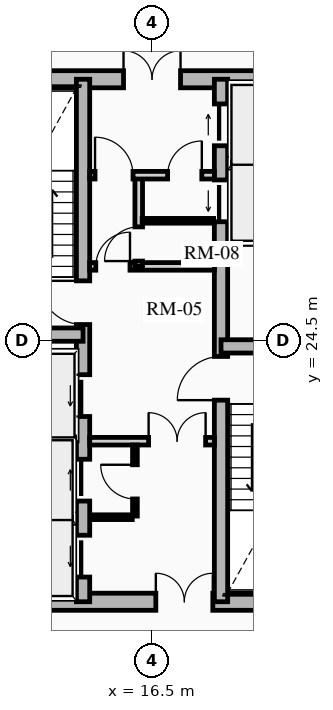
"""IFC4 building model, lengths in metres.
Left out: names, types, materials, properties, quantities, classifications, styles, units other than length and angle.
Written with IfcOpenShell. Run it as: python <this file> out.ifc"""

import sys

from ifc_helpers import new_model, si_unit, direction, frame, frame_2d, origin, place, context, subcontext, project, spatial, rectangle, extrude, source, transform, mapped, element, fill, save


model = new_model("IFC4")
c1 = context("Model", 3, precision=1e-05, world=origin(), true_north=direction((0.0, 1.0)))
c2 = subcontext(c1, "Body", "Model", "MODEL_VIEW")
j1 = project(units=[si_unit("LENGTHUNIT", "METRE"), si_unit("PLANEANGLEUNIT", "RADIAN")], contexts=[c1])
p1 = place(None, origin())
s1 = spatial("IfcSite", under=j1, at=p1, CompositionType="ELEMENT")
p2 = place(p1, origin())
s2 = spatial("IfcBuilding", under=s1, at=p2, CompositionType="ELEMENT")
p3 = place(p2, frame((0.0, 0.0, 125.44)))
s3 = spatial("IfcBuildingStorey", under=s2, at=p3, CompositionType="ELEMENT", Elevation=125.44)
p4 = place(p3, frame((11.15, 17.625, 0.0), z_axis=(0.0, 0.0, 1.0), x_axis=(1.0, 0.0, 0.0)))
e1 = element("IfcWall", 1, at=p4, inside=s3, PredefinedType="SHEAR", context=c2, shape_type="SweptSolid", body=[
    extrude(rectangle(XDim=10.7, YDim=0.45, at=frame_2d((5.35, 0.0))), origin(), (0.0, 0.0, 1.0), 3.72),
])
m1 = source(origin(), c2, "Body", "SweptSolid", [
    extrude(rectangle(XDim=1.5, YDim=2.02, at=frame_2d((0.75, 1.01))), frame((0.0, 0.235, 0.0), z_axis=(0.0, -1.0, 0.0), x_axis=(1.0, 0.0, 0.0)), (0.0, 0.0, 1.0), 0.47),
])
p5 = place(p4, frame((5.45, 0.0, 0.0)))
e2 = element("IfcOpeningElement", 2, at=p5, cuts=e1, PredefinedType="OPENING", context=c2, shape_type="MappedRepresentation", body=[
    mapped(m1, transform((0.0, 0.0, 0.0), x_axis=(1.0, 0.0, 0.0), y_axis=(0.0, 1.0, 0.0), z_axis=(0.0, 0.0, 1.0), scale=1.0)),
])
p6 = place(p3, frame((11.15, 31.375, 0.0), z_axis=(0.0, 0.0, 1.0), x_axis=(1.0, 0.0, 0.0)))
e3 = element("IfcWall", 3, at=p6, inside=s3, PredefinedType="SHEAR", context=c2, shape_type="SweptSolid", body=[
    extrude(rectangle(XDim=10.7, YDim=0.45, at=frame_2d((5.35, 0.0))), origin(), (0.0, 0.0, 1.0), 3.72),
])
p7 = place(p6, frame((4.6, 0.0, 0.0)))
e4 = element("IfcOpeningElement", 4, at=p7, cuts=e3, PredefinedType="OPENING", context=c2, shape_type="MappedRepresentation", body=[
    mapped(m1, transform((0.0, 0.0, 0.0), x_axis=(1.0, 0.0, 0.0), y_axis=(0.0, 1.0, 0.0), z_axis=(0.0, 0.0, 1.0), scale=1.0)),
])
p8 = place(p3, frame((14.685, 17.625, 0.0), z_axis=(0.0, 0.0, 1.0), x_axis=(0.0, 1.0, 0.0)))
e5 = element("IfcWall", 5, at=p8, inside=s3, PredefinedType="SHEAR", context=c2, shape_type="SweptSolid", body=[
    extrude(rectangle(XDim=13.75, YDim=0.35, at=frame_2d((6.875, 0.0))), origin(), (0.0, 0.0, 1.0), 3.72),
])
m2 = source(origin(), c2, "Body", "SweptSolid", [
    extrude(rectangle(XDim=1.1, YDim=2.015, at=frame_2d((0.55, 1.007))), frame((0.0, 0.185, 0.0), z_axis=(0.0, -1.0, 0.0), x_axis=(1.0, 0.0, 0.0)), (0.0, 0.0, 1.0), 0.37),
])
p9 = place(p8, frame((4.875, 0.0, 0.0)))
e6 = element("IfcOpeningElement", 6, at=p9, cuts=e5, PredefinedType="OPENING", context=c2, shape_type="MappedRepresentation", body=[
    mapped(m2, transform((0.0, 0.0, 0.0), x_axis=(1.0, 0.0, 0.0), y_axis=(0.0, 1.0, 0.0), z_axis=(0.0, 0.0, 1.0), scale=1.0)),
])
p10 = place(p8, frame((0.65, 0.0, 0.0)))
e7 = element("IfcOpeningElement", 7, at=p10, cuts=e5, PredefinedType="OPENING", context=c2, shape_type="MappedRepresentation", body=[
    mapped(m2, transform((0.0, 0.0, 0.0), x_axis=(1.0, 0.0, 0.0), y_axis=(0.0, 1.0, 0.0), z_axis=(0.0, 0.0, 1.0), scale=1.0)),
])
p11 = place(p8, frame((2.65, 0.0, 0.0)))
e8 = element("IfcOpeningElement", 8, at=p11, cuts=e5, PredefinedType="OPENING", context=c2, shape_type="MappedRepresentation", body=[
    mapped(m2, transform((0.0, 0.0, 0.0), x_axis=(1.0, 0.0, 0.0), y_axis=(0.0, 1.0, 0.0), z_axis=(0.0, 0.0, 1.0), scale=1.0)),
])
m3 = source(origin(), c2, "Body", "SweptSolid", [
    extrude(rectangle(XDim=1.15, YDim=2.02, at=frame_2d((0.575, 1.01))), frame((0.0, 0.185, 0.0), z_axis=(0.0, -1.0, 0.0), x_axis=(1.0, 0.0, 0.0)), (0.0, 0.0, 1.0), 0.37),
])
p12 = place(p8, frame((7.295, 0.0, 0.0)))
e9 = element("IfcOpeningElement", 9, at=p12, cuts=e5, PredefinedType="OPENING", context=c2, shape_type="MappedRepresentation", body=[
    mapped(m3, transform((0.0, 0.0, 0.0), x_axis=(1.0, 0.0, 0.0), y_axis=(0.0, 1.0, 0.0), z_axis=(0.0, 0.0, 1.0), scale=1.0)),
])
p13 = place(p3, frame((18.315, 17.625, 0.0), z_axis=(0.0, 0.0, 1.0), x_axis=(0.0, 1.0, 0.0)))
e10 = element("IfcWall", 10, at=p13, inside=s3, PredefinedType="SHEAR", context=c2, shape_type="SweptSolid", body=[
    extrude(rectangle(XDim=13.75, YDim=0.35, at=frame_2d((6.875, 0.0))), origin(), (0.0, 0.0, 1.0), 3.72),
])
p14 = place(p13, frame((10.0, 0.0, 0.0)))
e11 = element("IfcOpeningElement", 11, at=p14, cuts=e10, PredefinedType="OPENING", context=c2, shape_type="MappedRepresentation", body=[
    mapped(m2, transform((0.0, 0.0, 0.0), x_axis=(1.0, 0.0, 0.0), y_axis=(0.0, 1.0, 0.0), z_axis=(0.0, 0.0, 1.0), scale=1.0)),
])
p15 = place(p13, frame((12.0, 0.0, 0.0)))
e12 = element("IfcOpeningElement", 12, at=p15, cuts=e10, PredefinedType="OPENING", context=c2, shape_type="MappedRepresentation", body=[
    mapped(m2, transform((0.0, 0.0, 0.0), x_axis=(1.0, 0.0, 0.0), y_axis=(0.0, 1.0, 0.0), z_axis=(0.0, 0.0, 1.0), scale=1.0)),
])
p16 = place(p13, frame((5.305, 0.0, 0.0)))
e13 = element("IfcOpeningElement", 13, at=p16, cuts=e10, PredefinedType="OPENING", context=c2, shape_type="MappedRepresentation", body=[
    mapped(m3, transform((0.0, 0.0, 0.0), x_axis=(1.0, 0.0, 0.0), y_axis=(0.0, 1.0, 0.0), z_axis=(0.0, 0.0, 1.0), scale=1.0)),
])
for number, where, z_axis, x_axis in (
    (14, (11.4, 24.655, 0.0), (0.0, 0.0, 1.0), (1.0, 0.0, 0.0)),
    (15, (18.315, 24.345, 0.0), (0.0, 0.0, 1.0), (1.0, 0.0, 0.0)),
):
    element("IfcWall", number, at=place(p3, frame(where, z_axis=z_axis, x_axis=x_axis)), inside=s3, PredefinedType="SHEAR", context=c2, shape_type="SweptSolid", body=[
        extrude(rectangle(XDim=3.285, YDim=0.35, at=frame_2d((1.643, 0.0))), origin(), (0.0, 0.0, 1.0), 3.72),
    ])
for number, where, z_axis, x_axis in (
    (16, (11.52, 21.8, 0.0), (0.0, 0.0, 1.0), (1.0, 0.0, 0.0)),
    (17, (11.52, 19.825, 0.0), (0.0, 0.0, 1.0), (1.0, 0.0, 0.0)),
    (18, (18.51, 27.13, 0.0), (0.0, 0.0, 1.0), (1.0, 0.0, 0.0)),
    (19, (18.51, 29.175, 0.0), (0.0, 0.0, 1.0), (1.0, 0.0, 0.0)),
):
    element("IfcWall", number, at=place(p3, frame(where, z_axis=z_axis, x_axis=x_axis)), inside=s3, PredefinedType="SHEAR", context=c2, shape_type="SweptSolid", body=[
        extrude(rectangle(XDim=2.97, YDim=0.2, at=frame_2d((1.485, 0.0))), origin(), (0.0, 0.0, 1.0), 3.72),
    ])
p17 = place(p3, frame((14.86, 21.85, 0.0), z_axis=(0.0, 0.0, 1.0), x_axis=(1.0, 0.0, 0.0)))
e20 = element("IfcWall", 20, at=p17, inside=s3, PredefinedType="PARTITIONING", context=c2, shape_type="SweptSolid", body=[
    extrude(rectangle(XDim=3.28, YDim=0.2, at=frame_2d((1.64, 0.0))), origin(), (0.0, 0.0, 1.0), 3.425),
])
m4 = source(origin(), c2, "Body", "SweptSolid", [
    extrude(rectangle(XDim=1.5, YDim=2.02, at=frame_2d((0.75, 1.01))), frame((0.0, 0.11, 0.0), z_axis=(0.0, -1.0, 0.0), x_axis=(1.0, 0.0, 0.0)), (0.0, 0.0, 1.0), 0.22),
])
p18 = place(p17, frame((1.55, 0.0, 0.0)))
e21 = element("IfcOpeningElement", 21, at=p18, cuts=e20, PredefinedType="OPENING", context=c2, shape_type="MappedRepresentation", body=[
    mapped(m4, transform((0.0, 0.0, 0.0), x_axis=(1.0, 0.0, 0.0), y_axis=(0.0, 1.0, 0.0), z_axis=(0.0, 0.0, 1.0), scale=1.0)),
])
p19 = place(p3, frame((14.86, 26.45, 0.0), z_axis=(0.0, 0.0, 1.0), x_axis=(1.0, 0.0, 0.0)))
e22 = element("IfcWall", 22, at=p19, inside=s3, PredefinedType="PARTITIONING", context=c2, shape_type="SweptSolid", body=[
    extrude(rectangle(XDim=3.28, YDim=0.2, at=frame_2d((1.64, 0.0))), origin(), (0.0, 0.0, 1.0), 3.425),
])
m5 = source(origin(), c2, "Body", "SweptSolid", [
    extrude(rectangle(XDim=0.9, YDim=2.005, at=frame_2d((0.45, 1.002))), frame((0.0, 0.11, 0.0), z_axis=(0.0, -1.0, 0.0), x_axis=(1.0, 0.0, 0.0)), (0.0, 0.0, 1.0), 0.22),
])
p20 = place(p19, frame((0.16, 0.0, 0.0)))
e23 = element("IfcOpeningElement", 23, at=p20, cuts=e22, PredefinedType="OPENING", context=c2, shape_type="MappedRepresentation", body=[
    mapped(m5, transform((0.0, 0.0, 0.0), x_axis=(1.0, 0.0, 0.0), y_axis=(0.0, 1.0, 0.0), z_axis=(0.0, 0.0, 1.0), scale=1.0)),
])
p21 = place(p3, frame((16.15, 26.45, 0.0), z_axis=(0.0, 0.0, 1.0), x_axis=(0.0, 1.0, 0.0)))
e24 = element("IfcWall", 24, at=p21, inside=s3, PredefinedType="PARTITIONING", context=c2, shape_type="SweptSolid", body=[
    extrude(rectangle(XDim=2.4, YDim=0.2, at=frame_2d((1.2, 0.0))), origin(), (0.0, 0.0, 1.0), 3.425),
])
p22 = place(p21, frame((0.14, 0.0, 0.0)))
e25 = element("IfcOpeningElement", 25, at=p22, cuts=e24, PredefinedType="OPENING", context=c2, shape_type="MappedRepresentation", body=[
    mapped(m5, transform((0.0, 0.0, 0.0), x_axis=(1.0, 0.0, 0.0), y_axis=(0.0, 1.0, 0.0), z_axis=(0.0, 0.0, 1.0), scale=1.0)),
])
p23 = place(p3, frame((14.86, 28.85, 0.0), z_axis=(0.0, 0.0, 1.0), x_axis=(1.0, 0.0, 0.0)))
e26 = element("IfcWall", 26, at=p23, inside=s3, PredefinedType="PARTITIONING", context=c2, shape_type="SweptSolid", body=[
    extrude(rectangle(XDim=3.28, YDim=0.2, at=frame_2d((1.64, 0.0))), origin(), (0.0, 0.0, 1.0), 3.425),
])
m6 = source(origin(), c2, "Body", "SweptSolid", [
    extrude(rectangle(XDim=1.0, YDim=2.015, at=frame_2d((0.5, 1.007))), frame((0.0, 0.11, 0.0), z_axis=(0.0, -1.0, 0.0), x_axis=(1.0, 0.0, 0.0)), (0.0, 0.0, 1.0), 0.22),
])
p24 = place(p23, frame((0.14, 0.0, 0.0)))
e27 = element("IfcOpeningElement", 27, at=p24, cuts=e26, PredefinedType="OPENING", context=c2, shape_type="MappedRepresentation", body=[
    mapped(m6, transform((0.0, 0.0, 0.0), x_axis=(1.0, 0.0, 0.0), y_axis=(0.0, 1.0, 0.0), z_axis=(0.0, 0.0, 1.0), scale=1.0)),
])
p25 = place(p23, frame((2.05, 0.0, 0.0)))
e28 = element("IfcOpeningElement", 28, at=p25, cuts=e26, PredefinedType="OPENING", context=c2, shape_type="MappedRepresentation", body=[
    mapped(m5, transform((0.0, 0.0, 0.0), x_axis=(1.0, 0.0, 0.0), y_axis=(0.0, 1.0, 0.0), z_axis=(0.0, 0.0, 1.0), scale=1.0)),
])
p26 = place(p3, frame((16.05, 19.88, 0.0), z_axis=(0.0, 0.0, 1.0), x_axis=(0.0, 1.0, 0.0)))
e29 = element("IfcWall", 29, at=p26, inside=s3, PredefinedType="PARTITIONING", context=c2, shape_type="SweptSolid", body=[
    extrude(rectangle(XDim=1.87, YDim=0.125, at=frame_2d((0.935, 0.0))), origin(), (0.0, 0.0, 1.0), 3.425),
])
m7 = source(origin(), c2, "Body", "SweptSolid", [
    extrude(rectangle(XDim=0.9, YDim=2.005, at=frame_2d((0.45, 1.002))), frame((0.0, 0.073, 0.0), z_axis=(0.0, -1.0, 0.0), x_axis=(1.0, 0.0, 0.0)), (0.0, 0.0, 1.0), 0.145),
])
p27 = place(p26, frame((0.45, 0.0, 0.0)))
e30 = element("IfcOpeningElement", 30, at=p27, cuts=e29, PredefinedType="OPENING", context=c2, shape_type="MappedRepresentation", body=[
    mapped(m7, transform((0.0, 0.0, 0.0), x_axis=(1.0, 0.0, 0.0), y_axis=(0.0, 1.0, 0.0), z_axis=(0.0, 0.0, 1.0), scale=1.0)),
])
p28 = place(p3, frame((14.88, 19.85, 0.0), z_axis=(0.0, 0.0, 1.0), x_axis=(1.0, 0.0, 0.0)))
e31 = element("IfcWall", 31, at=p28, inside=s3, PredefinedType="PARTITIONING", context=c2, shape_type="SweptSolid", body=[
    extrude(rectangle(XDim=1.1, YDim=0.125, at=frame_2d((0.55, 0.0))), origin(), (0.0, 0.0, 1.0), 3.425),
])
p29 = place(p3, frame((16.24, 27.65, 0.0), z_axis=(0.0, 0.0, 1.0), x_axis=(1.0, 0.0, 0.0)))
e32 = element("IfcWall", 32, at=p29, inside=s3, PredefinedType="PARTITIONING", context=c2, shape_type="SweptSolid", body=[
    extrude(rectangle(XDim=1.88, YDim=0.125, at=frame_2d((0.94, 0.0))), origin(), (0.0, 0.0, 1.0), 3.425),
])
m8 = source(origin(), c2, "Body", "SweptSolid", [
    extrude(rectangle(XDim=1.1, YDim=2.015, at=frame_2d((0.55, 1.007))), frame((0.0, 0.025, 0.0), z_axis=(0.0, -1.0, 0.0), x_axis=(1.0, 0.0, 0.0)), (0.0, 0.0, 1.0), 0.05),
])
p30 = place(p9, origin())
e33 = element("IfcDoor", 33, at=p30, inside=s3, OperationType="SLIDING_TO_LEFT", PredefinedType="DOOR", context=c2, shape_type="MappedRepresentation", body=[
    mapped(m8, transform((0.0, 0.0, 0.0), x_axis=(1.0, 0.0, 0.0), y_axis=(0.0, 1.0, 0.0), z_axis=(0.0, 0.0, 1.0), scale=1.0)),
])
fill(e6, e33)
p31 = place(p10, origin())
e34 = element("IfcDoor", 34, at=p31, inside=s3, OperationType="SLIDING_TO_LEFT", PredefinedType="DOOR", context=c2, shape_type="MappedRepresentation", body=[
    mapped(m8, transform((0.0, 0.0, 0.0), x_axis=(1.0, 0.0, 0.0), y_axis=(0.0, 1.0, 0.0), z_axis=(0.0, 0.0, 1.0), scale=1.0)),
])
fill(e7, e34)
p32 = place(p11, origin())
e35 = element("IfcDoor", 35, at=p32, inside=s3, OperationType="SLIDING_TO_RIGHT", PredefinedType="DOOR", context=c2, shape_type="MappedRepresentation", body=[
    mapped(m8, transform((0.0, 0.0, 0.0), x_axis=(1.0, 0.0, 0.0), y_axis=(0.0, 1.0, 0.0), z_axis=(0.0, 0.0, 1.0), scale=1.0)),
])
fill(e8, e35)
p33 = place(p14, origin())
e36 = element("IfcDoor", 36, at=p33, inside=s3, OperationType="SLIDING_TO_LEFT", PredefinedType="DOOR", context=c2, shape_type="MappedRepresentation", body=[
    mapped(m8, transform((0.0, 0.0, 0.0), x_axis=(1.0, 0.0, 0.0), y_axis=(0.0, 1.0, 0.0), z_axis=(0.0, 0.0, 1.0), scale=1.0)),
])
fill(e11, e36)
p34 = place(p15, origin())
e37 = element("IfcDoor", 37, at=p34, inside=s3, OperationType="SLIDING_TO_RIGHT", PredefinedType="DOOR", context=c2, shape_type="MappedRepresentation", body=[
    mapped(m8, transform((0.0, 0.0, 0.0), x_axis=(1.0, 0.0, 0.0), y_axis=(0.0, 1.0, 0.0), z_axis=(0.0, 0.0, 1.0), scale=1.0)),
])
fill(e12, e37)
m9 = source(origin(), c2, "Body", "SweptSolid", [
    extrude(rectangle(XDim=1.15, YDim=2.02, at=frame_2d((0.575, 1.01))), frame((0.0, 0.025, 0.0), z_axis=(0.0, -1.0, 0.0), x_axis=(1.0, 0.0, 0.0)), (0.0, 0.0, 1.0), 0.05),
])
p35 = place(p12, origin())
e38 = element("IfcDoor", 38, at=p35, inside=s3, OperationType="SINGLE_SWING_RIGHT", PredefinedType="DOOR", context=c2, shape_type="MappedRepresentation", body=[
    mapped(m9, transform((0.0, 0.0, 0.0), x_axis=(1.0, 0.0, 0.0), y_axis=(0.0, 1.0, 0.0), z_axis=(0.0, 0.0, 1.0), scale=1.0)),
])
fill(e9, e38)
p36 = place(p16, origin())
e39 = element("IfcDoor", 39, at=p36, inside=s3, OperationType="SINGLE_SWING_LEFT", PredefinedType="DOOR", context=c2, shape_type="MappedRepresentation", body=[
    mapped(m9, transform((0.0, 0.0, 0.0), x_axis=(1.0, 0.0, 0.0), y_axis=(0.0, 1.0, 0.0), z_axis=(0.0, 0.0, 1.0), scale=1.0)),
])
fill(e13, e39)
m10 = source(origin(), c2, "Body", "SweptSolid", [
    extrude(rectangle(XDim=1.5, YDim=2.02, at=frame_2d((0.75, 1.01))), frame((0.0, 0.025, 0.0), z_axis=(0.0, -1.0, 0.0), x_axis=(1.0, 0.0, 0.0)), (0.0, 0.0, 1.0), 0.05),
])
p37 = place(p7, origin())
e40 = element("IfcDoor", 40, at=p37, inside=s3, OperationType="DOUBLE_DOOR_SINGLE_SWING", PredefinedType="DOOR", context=c2, shape_type="MappedRepresentation", body=[
    mapped(m10, transform((0.0, 0.0, 0.0), x_axis=(1.0, 0.0, 0.0), y_axis=(0.0, 1.0, 0.0), z_axis=(0.0, 0.0, 1.0), scale=1.0)),
])
fill(e4, e40)
p38 = place(p5, origin())
e41 = element("IfcDoor", 41, at=p38, inside=s3, OperationType="DOUBLE_DOOR_SINGLE_SWING", PredefinedType="DOOR", context=c2, shape_type="MappedRepresentation", body=[
    mapped(m10, transform((0.0, 0.0, 0.0), x_axis=(1.0, 0.0, 0.0), y_axis=(0.0, 1.0, 0.0), z_axis=(0.0, 0.0, 1.0), scale=1.0)),
])
fill(e2, e41)
p39 = place(p18, origin())
e42 = element("IfcDoor", 42, at=p39, inside=s3, OperationType="DOUBLE_DOOR_SINGLE_SWING", PredefinedType="DOOR", context=c2, shape_type="MappedRepresentation", body=[
    mapped(m10, transform((0.0, 0.0, 0.0), x_axis=(1.0, 0.0, 0.0), y_axis=(0.0, 1.0, 0.0), z_axis=(0.0, 0.0, 1.0), scale=1.0)),
])
fill(e21, e42)
m11 = source(origin(), c2, "Body", "SweptSolid", [
    extrude(rectangle(XDim=0.9, YDim=2.005, at=frame_2d((0.45, 1.002))), frame((0.0, 0.025, 0.0), z_axis=(0.0, -1.0, 0.0), x_axis=(1.0, 0.0, 0.0)), (0.0, 0.0, 1.0), 0.05),
])
p40 = place(p20, origin())
e43 = element("IfcDoor", 43, at=p40, inside=s3, OperationType="SINGLE_SWING_RIGHT", PredefinedType="DOOR", context=c2, shape_type="MappedRepresentation", body=[
    mapped(m11, transform((0.0, 0.0, 0.0), x_axis=(1.0, 0.0, 0.0), y_axis=(0.0, 1.0, 0.0), z_axis=(0.0, 0.0, 1.0), scale=1.0)),
])
fill(e23, e43)
m12 = source(origin(), c2, "Body", "SweptSolid", [
    extrude(rectangle(XDim=1.0, YDim=2.015, at=frame_2d((0.5, 1.007))), frame((0.0, 0.025, 0.0), z_axis=(0.0, -1.0, 0.0), x_axis=(1.0, 0.0, 0.0)), (0.0, 0.0, 1.0), 0.05),
])
p41 = place(p24, origin())
e44 = element("IfcDoor", 44, at=p41, inside=s3, OperationType="SINGLE_SWING_LEFT", PredefinedType="DOOR", context=c2, shape_type="MappedRepresentation", body=[
    mapped(m12, transform((0.0, 0.0, 0.0), x_axis=(1.0, 0.0, 0.0), y_axis=(0.0, 1.0, 0.0), z_axis=(0.0, 0.0, 1.0), scale=1.0)),
])
fill(e27, e44)
p42 = place(p27, origin())
e45 = element("IfcDoor", 45, at=p42, inside=s3, OperationType="SINGLE_SWING_RIGHT", PredefinedType="DOOR", context=c2, shape_type="MappedRepresentation", body=[
    mapped(m11, transform((0.0, 0.0, 0.0), x_axis=(1.0, 0.0, 0.0), y_axis=(0.0, 1.0, 0.0), z_axis=(0.0, 0.0, 1.0), scale=1.0)),
])
fill(e30, e45)
p43 = place(p22, origin())
e46 = element("IfcDoor", 46, at=p43, inside=s3, OperationType="SINGLE_SWING_LEFT", PredefinedType="DOOR", context=c2, shape_type="MappedRepresentation", body=[
    mapped(m11, transform((0.0, 0.0, 0.0), x_axis=(1.0, 0.0, 0.0), y_axis=(0.0, 1.0, 0.0), z_axis=(0.0, 0.0, 1.0), scale=1.0)),
])
fill(e25, e46)
p44 = place(p25, origin())
e47 = element("IfcDoor", 47, at=p44, inside=s3, OperationType="SINGLE_SWING_RIGHT", PredefinedType="DOOR", context=c2, shape_type="MappedRepresentation", body=[
    mapped(m11, transform((0.0, 0.0, 0.0), x_axis=(1.0, 0.0, 0.0), y_axis=(0.0, 1.0, 0.0), z_axis=(0.0, 0.0, 1.0), scale=1.0)),
])
fill(e28, e47)
save(model, sys.argv[1])
